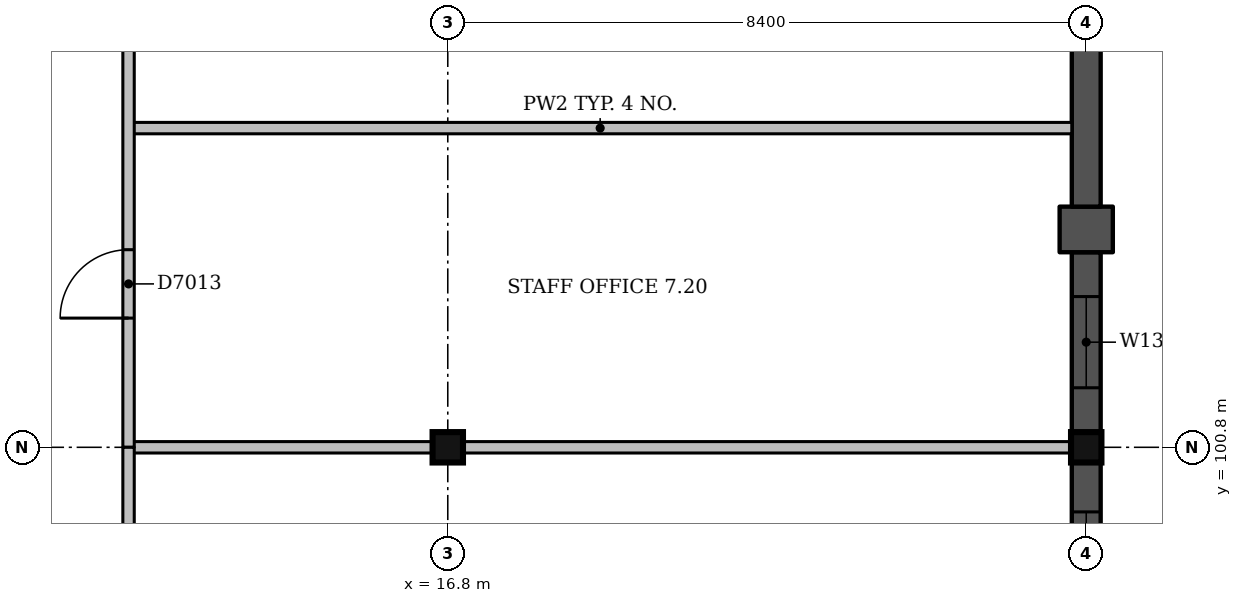
"""IFC4 building model, lengths in metres.
Left out: names, types, materials, properties, quantities, classifications, styles, units other than length and angle.
Written with IfcOpenShell. Run it as: python <this file> out.ifc"""

import sys

from ifc_helpers import new_model, si_unit, direction, frame, frame_2d, origin, origin_2d, place, context, subcontext, project, spatial, rectangle, extrude, element, fill, save


model = new_model("IFC4")
c1 = context("Model", 3, precision=1e-05, world=origin(), true_north=direction((0.0, 1.0)))
c2 = subcontext(c1, "Body", "Model", "MODEL_VIEW")
j1 = project(units=[si_unit("LENGTHUNIT", "METRE"), si_unit("PLANEANGLEUNIT", "RADIAN")], contexts=[c1])
p1 = place(None, origin())
s1 = spatial("IfcSite", under=j1, at=p1, CompositionType="ELEMENT")
p2 = place(p1, origin())
s2 = spatial("IfcBuilding", under=s1, at=p2, CompositionType="ELEMENT")
p3 = place(p2, frame((0.0, 0.0, 31.5)))
s3 = spatial("IfcBuildingStorey", under=s2, at=p3, CompositionType="ELEMENT", Elevation=31.5)
for number, where, z_axis, x_axis in (
    (1, (16.8, 100.8, 0.0), (0.0, 0.0, 1.0), (1.0, 0.0, 0.0)),
    (2, (25.2, 100.8, 0.0), (0.0, 0.0, 1.0), (1.0, 0.0, 0.0)),
):
    element("IfcColumn", number, at=place(p3, frame(where, z_axis=z_axis, x_axis=x_axis)), inside=s3, PredefinedType="COLUMN", context=c2, shape_type="SweptSolid", body=[
        extrude(rectangle(XDim=0.4, YDim=0.4, at=origin_2d()), origin(), (0.0, 0.0, 1.0), 4.5),
    ])
p4 = place(p3, frame((25.2, 96.9, 0.0), z_axis=(0.0, 0.0, 1.0), x_axis=(0.0, 1.0, 0.0)))
e3 = element("IfcWall", 3, at=p4, inside=s3, PredefinedType="SOLIDWALL", context=c2, shape_type="SweptSolid", body=[
    extrude(rectangle(XDim=3.7, YDim=0.38, at=frame_2d((1.85, 0.0))), origin(), (0.0, 0.0, 1.0), 3.6),
])
p5 = place(p4, frame((0.65, 0.0, 1.2)))
e4 = element("IfcOpeningElement", 4, at=p5, cuts=e3, PredefinedType="OPENING", context=c2, shape_type="SweptSolid", body=[
    extrude(rectangle(XDim=2.4, YDim=1.5, at=frame_2d((1.2, 0.75))), frame((0.0, 0.2, 0.0), z_axis=(0.0, -1.0, 0.0), x_axis=(1.0, 0.0, 0.0)), (0.0, 0.0, 1.0), 0.4),
])
p6 = place(p3, frame((25.2, 101.0, 0.0), z_axis=(0.0, 0.0, 1.0), x_axis=(0.0, 1.0, 0.0)))
e5 = element("IfcWall", 5, at=p6, inside=s3, PredefinedType="SOLIDWALL", context=c2, shape_type="SweptSolid", body=[
    extrude(rectangle(XDim=2.367, YDim=0.38, at=frame_2d((1.183, 0.0))), origin(), (0.0, 0.0, 1.0), 3.6),
])
p7 = place(p6, frame((0.583, 0.0, 0.9)))
e6 = element("IfcOpeningElement", 6, at=p7, cuts=e5, PredefinedType="OPENING", context=c2, shape_type="SweptSolid", body=[
    extrude(rectangle(XDim=1.2, YDim=2.1, at=frame_2d((0.6, 1.05))), frame((0.0, 0.2, 0.0), z_axis=(0.0, -1.0, 0.0), x_axis=(1.0, 0.0, 0.0)), (0.0, 0.0, 1.0), 0.4),
])
p8 = place(p3, frame((25.2, 103.367, 0.0), z_axis=(0.0, 0.0, 1.0), x_axis=(0.0, 1.0, 0.0)))
e7 = element("IfcWall", 7, at=p8, inside=s3, PredefinedType="SOLIDWALL", context=c2, shape_type="SweptSolid", body=[
    extrude(rectangle(XDim=0.6, YDim=0.7, at=frame_2d((0.3, 0.0))), origin(), (0.0, 0.0, 1.0), 3.6),
])
p9 = place(p3, frame((25.2, 103.967, 0.0), z_axis=(0.0, 0.0, 1.0), x_axis=(0.0, 1.0, 0.0)))
e8 = element("IfcWall", 8, at=p9, inside=s3, PredefinedType="SOLIDWALL", context=c2, shape_type="SweptSolid", body=[
    extrude(rectangle(XDim=2.066, YDim=0.38, at=frame_2d((1.033, 0.0))), origin(), (0.0, 0.0, 1.0), 3.6),
])
p10 = place(p3, frame((12.6, 100.8, 0.0), z_axis=(0.0, 0.0, 1.0), x_axis=(1.0, 0.0, 0.0)))
e9 = element("IfcWall", 9, at=p10, inside=s3, PredefinedType="PARTITIONING", context=c2, shape_type="SweptSolid", body=[
    extrude(rectangle(XDim=4.0, YDim=0.15, at=frame_2d((2.0, 0.0))), origin(), (0.0, 0.0, 1.0), 3.6),
])
p11 = place(p3, frame((17.0, 100.8, 0.0), z_axis=(0.0, 0.0, 1.0), x_axis=(1.0, 0.0, 0.0)))
e10 = element("IfcWall", 10, at=p11, inside=s3, PredefinedType="PARTITIONING", context=c2, shape_type="SweptSolid", body=[
    extrude(rectangle(XDim=8.0, YDim=0.15, at=frame_2d((4.0, 0.0))), origin(), (0.0, 0.0, 1.0), 3.6),
])
p12 = place(p3, frame((12.6, 105.0, 0.0), z_axis=(0.0, 0.0, 1.0), x_axis=(1.0, 0.0, 0.0)))
e11 = element("IfcWall", 11, at=p12, inside=s3, PredefinedType="PARTITIONING", context=c2, shape_type="SweptSolid", body=[
    extrude(rectangle(XDim=12.41, YDim=0.15, at=frame_2d((6.205, 0.0))), origin(), (0.0, 0.0, 1.0), 3.6),
])
p13 = place(p3, frame((12.6, 100.8, 0.0), z_axis=(0.0, 0.0, 1.0), x_axis=(0.0, 1.0, 0.0)))
e12 = element("IfcWall", 12, at=p13, inside=s3, PredefinedType="PARTITIONING", context=c2, shape_type="SweptSolid", body=[
    extrude(rectangle(XDim=8.4, YDim=0.15, at=frame_2d((4.2, 0.0))), origin(), (0.0, 0.0, 1.0), 3.6),
])
p14 = place(p13, frame((1.7, 0.0, 0.0)))
e13 = element("IfcOpeningElement", 13, at=p14, cuts=e12, PredefinedType="OPENING", context=c2, shape_type="SweptSolid", body=[
    extrude(rectangle(XDim=0.9, YDim=2.1, at=frame_2d((0.45, 1.05))), frame((0.0, 0.085, 0.0), z_axis=(0.0, -1.0, 0.0), x_axis=(1.0, 0.0, 0.0)), (0.0, 0.0, 1.0), 0.17),
])
p15 = place(p13, frame((5.9, 0.0, 0.0)))
e14 = element("IfcOpeningElement", 14, at=p15, cuts=e12, PredefinedType="OPENING", context=c2, shape_type="SweptSolid", body=[
    extrude(rectangle(XDim=0.9, YDim=2.1, at=frame_2d((0.45, 1.05))), frame((0.0, 0.085, 0.0), z_axis=(0.0, -1.0, 0.0), x_axis=(1.0, 0.0, 0.0)), (0.0, 0.0, 1.0), 0.17),
])
p16 = place(p3, frame((12.6, 84.0, 0.0), z_axis=(0.0, 0.0, 1.0), x_axis=(0.0, 1.0, 0.0)))
e15 = element("IfcWall", 15, at=p16, inside=s3, PredefinedType="PARTITIONING", context=c2, shape_type="SweptSolid", body=[
    extrude(rectangle(XDim=16.8, YDim=0.15, at=frame_2d((8.4, 0.0))), origin(), (0.0, 0.0, 1.0), 3.6),
])
p17 = place(p16, frame((12.2, 0.0, 0.0)))
e16 = element("IfcOpeningElement", 16, at=p17, cuts=e15, PredefinedType="OPENING", context=c2, shape_type="SweptSolid", body=[
    extrude(rectangle(XDim=1.0, YDim=2.1, at=frame_2d((0.5, 1.05))), frame((0.0, 0.085, 0.0), z_axis=(0.0, -1.0, 0.0), x_axis=(1.0, 0.0, 0.0)), (0.0, 0.0, 1.0), 0.17),
])
p18 = place(p5, origin())
e17 = element("IfcWindow", 17, at=p18, inside=s3, PartitioningType="SINGLE_PANEL", PredefinedType="WINDOW", context=c2, shape_type="SweptSolid", body=[
    extrude(rectangle(XDim=2.4, YDim=1.5, at=frame_2d((1.2, 0.75))), frame((0.0, 0.15, 0.0), z_axis=(0.0, -1.0, 0.0), x_axis=(1.0, 0.0, 0.0)), (0.0, 0.0, 1.0), 0.06),
])
fill(e4, e17)
p19 = place(p7, origin())
e18 = element("IfcWindow", 18, at=p19, inside=s3, PartitioningType="SINGLE_PANEL", PredefinedType="WINDOW", context=c2, shape_type="SweptSolid", body=[
    extrude(rectangle(XDim=1.2, YDim=2.1, at=frame_2d((0.6, 1.05))), frame((0.0, 0.15, 0.0), z_axis=(0.0, -1.0, 0.0), x_axis=(1.0, 0.0, 0.0)), (0.0, 0.0, 1.0), 0.06),
])
fill(e6, e18)
p20 = place(p14, origin())
e19 = element("IfcDoor", 19, at=p20, inside=s3, OperationType="SINGLE_SWING_LEFT", PredefinedType="DOOR", context=c2, shape_type="SweptSolid", body=[
    extrude(rectangle(XDim=0.9, YDim=2.1, at=frame_2d((0.45, 1.05))), frame((0.0, 0.025, 0.0), z_axis=(0.0, -1.0, 0.0), x_axis=(1.0, 0.0, 0.0)), (0.0, 0.0, 1.0), 0.05),
])
fill(e13, e19)
save(model, sys.argv[1])
